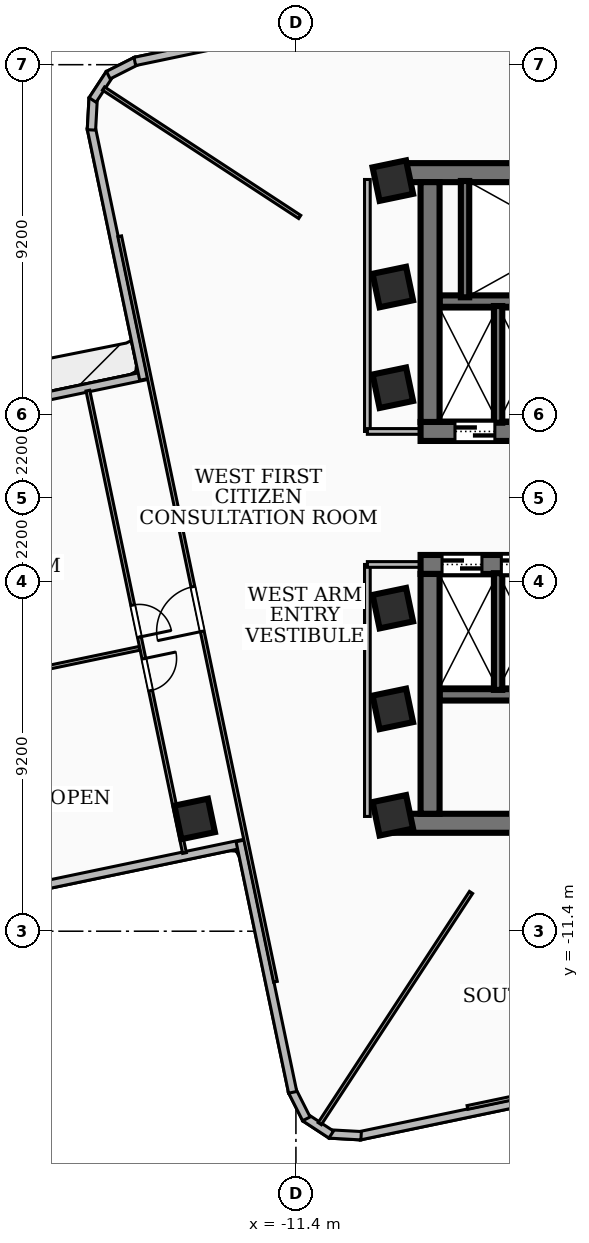
"""IFC4 building model, lengths in metres.
Left out: names, types, materials, properties, quantities, classifications, styles, units other than length and angle.
Written with IfcOpenShell. Run it as: python <this file> out.ifc"""

import sys

from ifc_helpers import new_model, si_unit, direction, frame, frame_2d, origin, origin_2d, place, context, subcontext, project, spatial, rectangle, extrude, element, fill, save


model = new_model("IFC4")
c1 = context("Model", 3, precision=1e-05, world=origin(), true_north=direction((0.0, 1.0)))
c2 = subcontext(c1, "Body", "Model", "MODEL_VIEW")
j1 = project(units=[si_unit("LENGTHUNIT", "METRE"), si_unit("PLANEANGLEUNIT", "RADIAN")], contexts=[c1])
p1 = place(None, origin())
s1 = spatial("IfcSite", under=j1, at=p1, CompositionType="ELEMENT")
p2 = place(p1, origin())
s2 = spatial("IfcBuilding", under=s1, at=p2, CompositionType="ELEMENT")
p3 = place(p2, frame((0.0, 0.0, 111.96)))
s3 = spatial("IfcBuildingStorey", under=s2, at=p3, CompositionType="ELEMENT", Elevation=111.96)
p4 = place(p3, frame((-8.78, 8.56, 0.0), z_axis=(0.0, 0.0, 1.0), x_axis=(1.0, 0.0, 0.0)))
e1 = element("IfcWall", 1, at=p4, inside=s3, PredefinedType="SHEAR", context=c2, shape_type="SweptSolid", body=[
    extrude(rectangle(XDim=17.56, YDim=0.5, at=frame_2d((8.78, 0.0))), origin(), (0.0, 0.0, 1.0), 4.06),
])
p5 = place(p3, frame((8.12, 1.75, 0.0), z_axis=(0.0, 0.0, 1.0), x_axis=(-1.0, 0.0, 0.0)))
e2 = element("IfcWall", 2, at=p5, inside=s3, PredefinedType="SHEAR", context=c2, shape_type="SweptSolid", body=[
    extrude(rectangle(XDim=16.24, YDim=0.5, at=frame_2d((8.12, 0.0))), origin(), (0.0, 0.0, 1.0), 4.06),
])
p6 = place(p5, frame((7.45, 0.0, 0.0)))
e3 = element("IfcOpeningElement", 3, at=p6, cuts=e2, PredefinedType="OPENING", context=c2, shape_type="SweptSolid", body=[
    extrude(rectangle(XDim=1.0, YDim=2.1, at=frame_2d((0.5, 1.05))), frame((0.0, 0.26, 0.0), z_axis=(0.0, -1.0, 0.0), x_axis=(1.0, 0.0, 0.0)), (0.0, 0.0, 1.0), 0.52),
])
p7 = place(p5, frame((14.285, 0.0, 0.0)))
e4 = element("IfcOpeningElement", 4, at=p7, cuts=e2, PredefinedType="OPENING", context=c2, shape_type="SweptSolid", body=[
    extrude(rectangle(XDim=1.05, YDim=2.15, at=frame_2d((0.525, 1.075))), frame((0.0, 0.26, 0.0), z_axis=(0.0, -1.0, 0.0), x_axis=(1.0, 0.0, 0.0)), (0.0, 0.0, 1.0), 0.52),
])
p8 = place(p5, frame((12.725, 0.0, 0.0)))
e5 = element("IfcOpeningElement", 5, at=p8, cuts=e2, PredefinedType="OPENING", context=c2, shape_type="SweptSolid", body=[
    extrude(rectangle(XDim=1.05, YDim=2.15, at=frame_2d((0.525, 1.075))), frame((0.0, 0.26, 0.0), z_axis=(0.0, -1.0, 0.0), x_axis=(1.0, 0.0, 0.0)), (0.0, 0.0, 1.0), 0.52),
])
p9 = place(p5, frame((11.165, 0.0, 0.0)))
e6 = element("IfcOpeningElement", 6, at=p9, cuts=e2, PredefinedType="OPENING", context=c2, shape_type="SweptSolid", body=[
    extrude(rectangle(XDim=1.05, YDim=2.15, at=frame_2d((0.525, 1.075))), frame((0.0, 0.26, 0.0), z_axis=(0.0, -1.0, 0.0), x_axis=(1.0, 0.0, 0.0)), (0.0, 0.0, 1.0), 0.52),
])
p10 = place(p5, frame((3.85, 0.0, 0.0)))
e7 = element("IfcOpeningElement", 7, at=p10, cuts=e2, PredefinedType="OPENING", context=c2, shape_type="SweptSolid", body=[
    extrude(rectangle(XDim=0.9, YDim=2.06, at=frame_2d((0.45, 1.03))), frame((0.0, 0.26, 0.0), z_axis=(0.0, -1.0, 0.0), x_axis=(1.0, 0.0, 0.0)), (0.0, 0.0, 1.0), 0.52),
])
p11 = place(p5, frame((2.35, 0.0, 0.0)))
e8 = element("IfcOpeningElement", 8, at=p11, cuts=e2, PredefinedType="OPENING", context=c2, shape_type="SweptSolid", body=[
    extrude(rectangle(XDim=0.9, YDim=2.06, at=frame_2d((0.45, 1.03))), frame((0.0, 0.26, 0.0), z_axis=(0.0, -1.0, 0.0), x_axis=(1.0, 0.0, 0.0)), (0.0, 0.0, 1.0), 0.52),
])
p12 = place(p5, frame((0.8, 0.0, 0.0)))
e9 = element("IfcOpeningElement", 9, at=p12, cuts=e2, PredefinedType="OPENING", context=c2, shape_type="SweptSolid", body=[
    extrude(rectangle(XDim=0.9, YDim=2.06, at=frame_2d((0.45, 1.03))), frame((0.0, 0.26, 0.0), z_axis=(0.0, -1.0, 0.0), x_axis=(1.0, 0.0, 0.0)), (0.0, 0.0, 1.0), 0.52),
])
p13 = place(p3, frame((-7.87, 2.0, 0.0), z_axis=(0.0, 0.0, 1.0), x_axis=(0.0, 1.0, 0.0)))
e10 = element("IfcWall", 10, at=p13, inside=s3, PredefinedType="SHEAR", context=c2, shape_type="SweptSolid", body=[
    extrude(rectangle(XDim=6.31, YDim=0.5, at=frame_2d((3.155, 0.0))), origin(), (0.0, 0.0, 1.0), 4.06),
])
p14 = place(p3, frame((7.62, 5.18, 0.0), z_axis=(0.0, 0.0, 1.0), x_axis=(-1.0, 0.0, 0.0)))
e11 = element("IfcWall", 11, at=p14, inside=s3, PredefinedType="SOLIDWALL", context=c2, shape_type="SweptSolid", body=[
    extrude(rectangle(XDim=15.24, YDim=0.3, at=frame_2d((7.62, 0.0))), origin(), (0.0, 0.0, 1.0), 4.06),
])
p15 = place(p14, frame((5.77, 0.0, 0.0)))
e12 = element("IfcOpeningElement", 12, at=p15, cuts=e11, PredefinedType="OPENING", context=c2, shape_type="SweptSolid", body=[
    extrude(rectangle(XDim=1.1, YDim=2.15, at=frame_2d((0.55, 1.075))), frame((0.0, 0.16, 0.0), z_axis=(0.0, -1.0, 0.0), x_axis=(1.0, 0.0, 0.0)), (0.0, 0.0, 1.0), 0.32),
])
p16 = place(p14, frame((2.97, 0.0, 0.0)))
e13 = element("IfcOpeningElement", 13, at=p16, cuts=e11, PredefinedType="OPENING", context=c2, shape_type="SweptSolid", body=[
    extrude(rectangle(XDim=1.1, YDim=2.15, at=frame_2d((0.55, 1.075))), frame((0.0, 0.16, 0.0), z_axis=(0.0, -1.0, 0.0), x_axis=(1.0, 0.0, 0.0)), (0.0, 0.0, 1.0), 0.32),
])
p17 = place(p14, frame((7.97, 0.0, 0.0)))
e14 = element("IfcOpeningElement", 14, at=p17, cuts=e11, PredefinedType="OPENING", context=c2, shape_type="SweptSolid", body=[
    extrude(rectangle(XDim=1.0, YDim=2.1, at=frame_2d((0.5, 1.05))), frame((0.0, 0.16, 0.0), z_axis=(0.0, -1.0, 0.0), x_axis=(1.0, 0.0, 0.0)), (0.0, 0.0, 1.0), 0.32),
])
p18 = place(p3, frame((8.78, -8.56, 0.0), z_axis=(0.0, 0.0, 1.0), x_axis=(-1.0, 0.0, 0.0)))
e15 = element("IfcWall", 15, at=p18, inside=s3, PredefinedType="SHEAR", context=c2, shape_type="SweptSolid", body=[
    extrude(rectangle(XDim=17.56, YDim=0.5, at=frame_2d((8.78, 0.0))), origin(), (0.0, 0.0, 1.0), 4.06),
])
p19 = place(p3, frame((-8.12, -1.75, 0.0), z_axis=(0.0, 0.0, 1.0), x_axis=(1.0, 0.0, 0.0)))
e16 = element("IfcWall", 16, at=p19, inside=s3, PredefinedType="SHEAR", context=c2, shape_type="SweptSolid", body=[
    extrude(rectangle(XDim=16.24, YDim=0.5, at=frame_2d((8.12, 0.0))), origin(), (0.0, 0.0, 1.0), 4.06),
])
p20 = place(p19, frame((7.45, 0.0, 0.0)))
e17 = element("IfcOpeningElement", 17, at=p20, cuts=e16, PredefinedType="OPENING", context=c2, shape_type="SweptSolid", body=[
    extrude(rectangle(XDim=1.0, YDim=2.1, at=frame_2d((0.5, 1.05))), frame((0.0, 0.26, 0.0), z_axis=(0.0, -1.0, 0.0), x_axis=(1.0, 0.0, 0.0)), (0.0, 0.0, 1.0), 0.52),
])
p21 = place(p19, frame((12.65, 0.0, 0.0)))
e18 = element("IfcOpeningElement", 18, at=p21, cuts=e16, PredefinedType="OPENING", context=c2, shape_type="SweptSolid", body=[
    extrude(rectangle(XDim=0.9, YDim=2.06, at=frame_2d((0.45, 1.03))), frame((0.0, 0.26, 0.0), z_axis=(0.0, -1.0, 0.0), x_axis=(1.0, 0.0, 0.0)), (0.0, 0.0, 1.0), 0.52),
])
p22 = place(p19, frame((0.565, 0.0, 0.0)))
e19 = element("IfcOpeningElement", 19, at=p22, cuts=e16, PredefinedType="OPENING", context=c2, shape_type="SweptSolid", body=[
    extrude(rectangle(XDim=1.05, YDim=2.15, at=frame_2d((0.525, 1.075))), frame((0.0, 0.26, 0.0), z_axis=(0.0, -1.0, 0.0), x_axis=(1.0, 0.0, 0.0)), (0.0, 0.0, 1.0), 0.52),
])
p23 = place(p19, frame((2.125, 0.0, 0.0)))
e20 = element("IfcOpeningElement", 20, at=p23, cuts=e16, PredefinedType="OPENING", context=c2, shape_type="SweptSolid", body=[
    extrude(rectangle(XDim=1.05, YDim=2.15, at=frame_2d((0.525, 1.075))), frame((0.0, 0.26, 0.0), z_axis=(0.0, -1.0, 0.0), x_axis=(1.0, 0.0, 0.0)), (0.0, 0.0, 1.0), 0.52),
])
p24 = place(p19, frame((3.685, 0.0, 0.0)))
e21 = element("IfcOpeningElement", 21, at=p24, cuts=e16, PredefinedType="OPENING", context=c2, shape_type="SweptSolid", body=[
    extrude(rectangle(XDim=1.05, YDim=2.15, at=frame_2d((0.525, 1.075))), frame((0.0, 0.26, 0.0), z_axis=(0.0, -1.0, 0.0), x_axis=(1.0, 0.0, 0.0)), (0.0, 0.0, 1.0), 0.52),
])
p25 = place(p3, frame((-7.87, -8.31, 0.0), z_axis=(0.0, 0.0, 1.0), x_axis=(0.0, 1.0, 0.0)))
e22 = element("IfcWall", 22, at=p25, inside=s3, PredefinedType="SHEAR", context=c2, shape_type="SweptSolid", body=[
    extrude(rectangle(XDim=6.31, YDim=0.5, at=frame_2d((3.155, 0.0))), origin(), (0.0, 0.0, 1.0), 4.06),
])
p26 = place(p3, frame((-7.62, -5.18, 0.0), z_axis=(0.0, 0.0, 1.0), x_axis=(1.0, 0.0, 0.0)))
e23 = element("IfcWall", 23, at=p26, inside=s3, PredefinedType="SOLIDWALL", context=c2, shape_type="SweptSolid", body=[
    extrude(rectangle(XDim=15.24, YDim=0.3, at=frame_2d((7.62, 0.0))), origin(), (0.0, 0.0, 1.0), 4.06),
])
p27 = place(p26, frame((5.77, 0.0, 0.0)))
e24 = element("IfcOpeningElement", 24, at=p27, cuts=e23, PredefinedType="OPENING", context=c2, shape_type="SweptSolid", body=[
    extrude(rectangle(XDim=1.1, YDim=2.15, at=frame_2d((0.55, 1.075))), frame((0.0, 0.16, 0.0), z_axis=(0.0, -1.0, 0.0), x_axis=(1.0, 0.0, 0.0)), (0.0, 0.0, 1.0), 0.32),
])
p28 = place(p26, frame((7.97, 0.0, 0.0)))
e25 = element("IfcOpeningElement", 25, at=p28, cuts=e23, PredefinedType="OPENING", context=c2, shape_type="SweptSolid", body=[
    extrude(rectangle(XDim=1.0, YDim=2.1, at=frame_2d((0.5, 1.05))), frame((0.0, 0.16, 0.0), z_axis=(0.0, -1.0, 0.0), x_axis=(1.0, 0.0, 0.0)), (0.0, 0.0, 1.0), 0.32),
])
p29 = place(p3, frame((-6.95, 5.28, 0.0), z_axis=(0.0, 0.0, 1.0), x_axis=(0.0, 1.0, 0.0)))
e26 = element("IfcWall", 26, at=p29, inside=s3, PredefinedType="SOLIDWALL", context=c2, shape_type="SweptSolid", body=[
    extrude(rectangle(XDim=3.06, YDim=0.22, at=frame_2d((1.53, 0.0))), origin(), (0.0, 0.0, 1.0), 4.06),
])
for number, where, z_axis, x_axis in (
    (27, (-6.08, 1.98, 0.0), (0.0, 0.0, 1.0), (0.0, 1.0, 0.0)),
    (28, (-6.08, -5.05, 0.0), (0.0, 0.0, 1.0), (0.0, 1.0, 0.0)),
):
    element("IfcWall", number, at=place(p3, frame(where, z_axis=z_axis, x_axis=x_axis)), inside=s3, PredefinedType="SOLIDWALL", context=c2, shape_type="SweptSolid", body=[
        extrude(rectangle(XDim=3.07, YDim=0.22, at=frame_2d((1.535, 0.0))), origin(), (0.0, 0.0, 1.0), 4.06),
    ])
for number, where, z_axis, x_axis in (
    (29, (-8.85, -5.55, 0.0), (0.0, 0.0, 1.0), (0.979, 0.204, 0.0)),
    (30, (-8.85, -2.9, 0.0), (0.0, 0.0, 1.0), (0.979, 0.204, 0.0)),
    (31, (-8.85, 2.9, 0.0), (0.0, 0.0, 1.0), (0.979, 0.204, 0.0)),
    (32, (-8.85, 5.55, 0.0), (0.0, 0.0, 1.0), (0.979, 0.204, 0.0)),
    (33, (-8.85, 8.35, 0.0), (0.0, 0.0, 1.0), (0.979, 0.204, 0.0)),
    (34, (-8.85, -8.35, 0.0), (0.0, 0.0, 1.0), (0.979, 0.204, 0.0)),
    (35, (-14.064, -8.445, 0.0), (0.0, 0.0, 1.0), (0.979, 0.204, 0.0)),
):
    element("IfcColumn", number, at=place(p3, frame(where, z_axis=z_axis, x_axis=x_axis)), inside=s3, PredefinedType="COLUMN", context=c2, shape_type="SweptSolid", body=[
        extrude(rectangle(XDim=0.9, YDim=0.9, at=origin_2d()), origin(), (0.0, 0.0, 1.0), 4.32),
    ])
p30 = place(p3, frame((-12.763, -9.092, 0.0), z_axis=(0.0, 0.0, 1.0), x_axis=(-0.97886813171, -0.204492495517, 0.0)))
e36 = element("IfcWall", 36, at=p30, inside=s3, PredefinedType="SOLIDWALL", context=c2, shape_type="SweptSolid", body=[
    extrude(rectangle(XDim=13.458, YDim=0.22, at=frame_2d((6.729, 0.0))), origin(), (0.0, 0.0, 1.0), 4.06),
])
p31 = place(p30, frame((10.257, 0.0, 0.85)))
e37 = element("IfcOpeningElement", 37, at=p31, cuts=e36, PredefinedType="OPENING", context=c2, shape_type="SweptSolid", body=[
    extrude(rectangle(XDim=2.1, YDim=2.0, at=frame_2d((1.05, 1.0))), frame((0.0, 0.12, 0.0), z_axis=(0.0, -1.0, 0.0), x_axis=(1.0, 0.0, 0.0)), (0.0, 0.0, 1.0), 0.24),
])
p32 = place(p3, frame((-28.509, 0.47, 0.0), z_axis=(0.0, 0.0, 1.0), x_axis=(0.97885663995, 0.204547496749, 0.0)))
e38 = element("IfcWall", 38, at=p32, inside=s3, PredefinedType="SOLIDWALL", context=c2, shape_type="SweptSolid", body=[
    extrude(rectangle(XDim=13.459, YDim=0.22, at=frame_2d((6.729, 0.0))), origin(), (0.0, 0.0, 1.0), 4.06),
])
p33 = place(p32, frame((1.1, 0.0, 0.85)))
e39 = element("IfcOpeningElement", 39, at=p33, cuts=e38, PredefinedType="OPENING", context=c2, shape_type="SweptSolid", body=[
    extrude(rectangle(XDim=2.1, YDim=1.6, at=frame_2d((1.05, 0.8))), frame((0.0, 0.12, 0.0), z_axis=(0.0, -1.0, 0.0), x_axis=(1.0, 0.0, 0.0)), (0.0, 0.0, 1.0), 0.24),
])
p34 = place(p3, frame((-15.403, 3.119, 0.0), z_axis=(0.0, 0.0, 1.0), x_axis=(-0.204509735336, 0.978864530031, 0.0)))
e40 = element("IfcWall", 40, at=p34, inside=s3, PredefinedType="SOLIDWALL", context=c2, shape_type="SweptSolid", body=[
    extrude(rectangle(XDim=6.757, YDim=0.22, at=frame_2d((3.378, 0.0))), origin(), (0.0, 0.0, 1.0), 4.06),
])
p35 = place(p3, frame((-16.781, 9.684, 0.0), z_axis=(0.0, 0.0, 1.0), x_axis=(0.055016197793, 0.998485462078, 0.0)))
e41 = element("IfcWall", 41, at=p35, inside=s3, PredefinedType="SOLIDWALL", context=c2, shape_type="SweptSolid", body=[
    extrude(rectangle(XDim=0.834, YDim=0.22, at=frame_2d((0.417, 0.0))), origin(), (0.0, 0.0, 1.0), 4.06),
])
p36 = place(p3, frame((-16.75, 10.471, 0.0), z_axis=(0.0, 0.0, 1.0), x_axis=(0.54760232045, 0.836738727822, 0.0)))
e42 = element("IfcWall", 42, at=p36, inside=s3, PredefinedType="SOLIDWALL", context=c2, shape_type="SweptSolid", body=[
    extrude(rectangle(XDim=0.82, YDim=0.22, at=frame_2d((0.41, 0.0))), origin(), (0.0, 0.0, 1.0), 4.06),
])
p37 = place(p3, frame((-16.337, 11.125, 0.0), z_axis=(0.0, 0.0, 1.0), x_axis=(0.892485652426, 0.45107578101, 0.0)))
e43 = element("IfcWall", 43, at=p37, inside=s3, PredefinedType="SOLIDWALL", context=c2, shape_type="SweptSolid", body=[
    extrude(rectangle(XDim=0.833, YDim=0.22, at=frame_2d((0.417, 0.0))), origin(), (0.0, 0.0, 1.0), 4.06),
])
p38 = place(p3, frame((-15.639, 11.485, 0.0), z_axis=(0.0, 0.0, 1.0), x_axis=(0.978870573598, 0.204480806295, 0.0)))
e44 = element("IfcWall", 44, at=p38, inside=s3, PredefinedType="SOLIDWALL", context=c2, shape_type="SweptSolid", body=[
    extrude(rectangle(XDim=6.758, YDim=0.22, at=frame_2d((3.379, 0.0))), origin(), (0.0, 0.0, 1.0), 4.06),
])
p39 = place(p3, frame((-3.119, -15.403, 0.0), z_axis=(0.0, 0.0, 1.0), x_axis=(-0.978864530031, -0.204509735336, 0.0)))
e45 = element("IfcWall", 45, at=p39, inside=s3, PredefinedType="SOLIDWALL", context=c2, shape_type="SweptSolid", body=[
    extrude(rectangle(XDim=6.757, YDim=0.22, at=frame_2d((3.378, 0.0))), origin(), (0.0, 0.0, 1.0), 3.29),
])
p40 = place(p3, frame((-9.684, -16.781, 0.0), z_axis=(0.0, 0.0, 1.0), x_axis=(-0.998485462078, 0.055016197793, 0.0)))
e46 = element("IfcWall", 46, at=p40, inside=s3, PredefinedType="SOLIDWALL", context=c2, shape_type="SweptSolid", body=[
    extrude(rectangle(XDim=0.834, YDim=0.22, at=frame_2d((0.417, 0.0))), origin(), (0.0, 0.0, 1.0), 4.06),
])
p41 = place(p3, frame((-10.471, -16.75, 0.0), z_axis=(0.0, 0.0, 1.0), x_axis=(-0.836738727822, 0.54760232045, 0.0)))
e47 = element("IfcWall", 47, at=p41, inside=s3, PredefinedType="SOLIDWALL", context=c2, shape_type="SweptSolid", body=[
    extrude(rectangle(XDim=0.82, YDim=0.22, at=frame_2d((0.41, 0.0))), origin(), (0.0, 0.0, 1.0), 4.06),
])
p42 = place(p3, frame((-11.125, -16.337, 0.0), z_axis=(0.0, 0.0, 1.0), x_axis=(-0.45107578101, 0.892485652426, 0.0)))
e48 = element("IfcWall", 48, at=p42, inside=s3, PredefinedType="SOLIDWALL", context=c2, shape_type="SweptSolid", body=[
    extrude(rectangle(XDim=0.833, YDim=0.22, at=frame_2d((0.417, 0.0))), origin(), (0.0, 0.0, 1.0), 4.06),
])
p43 = place(p3, frame((-11.485, -15.639, 0.0), z_axis=(0.0, 0.0, 1.0), x_axis=(-0.204480806295, 0.978870573598, 0.0)))
e49 = element("IfcWall", 49, at=p43, inside=s3, PredefinedType="SOLIDWALL", context=c2, shape_type="SweptSolid", body=[
    extrude(rectangle(XDim=6.758, YDim=0.22, at=frame_2d((3.379, 0.0))), origin(), (0.0, 0.0, 1.0), 4.06),
])
p44 = place(p3, frame((-9.52, 1.75, 0.0), z_axis=(0.0, 0.0, 1.0), x_axis=(0.0, 1.0, 0.0)))
e50 = element("IfcWall", 50, at=p44, inside=s3, PredefinedType="PARTITIONING", context=c2, shape_type="SweptSolid", body=[
    extrude(rectangle(XDim=6.63, YDim=0.15, at=frame_2d((3.315, 0.0))), origin(), (0.0, 0.0, 1.0), 3.29),
])
p45 = place(p3, frame((-7.85, 1.75, 0.0), z_axis=(0.0, 0.0, 1.0), x_axis=(-1.0, 0.0, 0.0)))
e51 = element("IfcWall", 51, at=p45, inside=s3, PredefinedType="PARTITIONING", context=c2, shape_type="SweptSolid", body=[
    extrude(rectangle(XDim=1.67, YDim=0.15, at=frame_2d((0.835, 0.0))), origin(), (0.0, 0.0, 1.0), 3.29),
])
p46 = place(p3, frame((-9.52, -8.38, 0.0), z_axis=(0.0, 0.0, 1.0), x_axis=(0.0, 1.0, 0.0)))
e52 = element("IfcWall", 52, at=p46, inside=s3, PredefinedType="PARTITIONING", context=c2, shape_type="SweptSolid", body=[
    extrude(rectangle(XDim=6.63, YDim=0.15, at=frame_2d((3.315, 0.0))), origin(), (0.0, 0.0, 1.0), 3.29),
])
p47 = place(p3, frame((-7.85, -1.75, 0.0), z_axis=(0.0, 0.0, 1.0), x_axis=(-1.0, 0.0, 0.0)))
e53 = element("IfcWall", 53, at=p47, inside=s3, PredefinedType="PARTITIONING", context=c2, shape_type="SweptSolid", body=[
    extrude(rectangle(XDim=1.67, YDim=0.15, at=frame_2d((0.835, 0.0))), origin(), (0.0, 0.0, 1.0), 3.29),
])
p48 = place(p3, frame((-11.3, 7.394, 0.0), z_axis=(0.0, 0.0, 1.0), x_axis=(-0.836731843599, 0.547612839429, 0.0)))
e54 = element("IfcWall", 54, at=p48, inside=s3, PredefinedType="PARTITIONING", context=c2, shape_type="SweptSolid", body=[
    extrude(rectangle(XDim=6.17, YDim=0.1, at=frame_2d((3.085, 0.0))), origin(), (0.0, 0.0, 1.0), 4.06),
])
p49 = place(p3, frame((-6.792, -10.38, 0.0), z_axis=(0.0, 0.0, 1.0), x_axis=(-0.547596764532, -0.836742363858, 0.0)))
e55 = element("IfcWall", 55, at=p49, inside=s3, PredefinedType="PARTITIONING", context=c2, shape_type="SweptSolid", body=[
    extrude(rectangle(XDim=7.27, YDim=0.1, at=frame_2d((3.635, 0.0))), origin(), (0.0, 0.0, 1.0), 3.29),
])
p50 = place(p3, frame((-11.939, -12.73, 0.0), z_axis=(0.0, 0.0, 1.0), x_axis=(-0.204503489908, 0.978865834839, 0.0)))
e56 = element("IfcWall", 56, at=p50, inside=s3, PredefinedType="PARTITIONING", context=c2, shape_type="SweptSolid", body=[
    extrude(rectangle(XDim=20.04, YDim=0.1, at=frame_2d((10.02, 0.0))), origin(), (0.0, 0.0, 1.0), 3.29),
])
p51 = place(p50, frame((9.42, 0.0, 0.0)))
e57 = element("IfcOpeningElement", 57, at=p51, cuts=e56, PredefinedType="OPENING", context=c2, shape_type="SweptSolid", body=[
    extrude(rectangle(XDim=1.2, YDim=2.1, at=frame_2d((0.6, 1.05))), frame((0.0, 0.06, 0.0), z_axis=(0.0, -1.0, 0.0), x_axis=(1.0, 0.0, 0.0)), (0.0, 0.0, 1.0), 0.12),
])
p52 = place(p3, frame((-15.519, -3.957, 0.0), z_axis=(0.0, 0.0, 1.0), x_axis=(-0.978858202992, -0.20454001671, 0.0)))
e58 = element("IfcWall", 58, at=p52, inside=s3, PredefinedType="PARTITIONING", context=c2, shape_type="SweptSolid", body=[
    extrude(rectangle(XDim=13.214, YDim=0.1, at=frame_2d((6.607, 0.0))), origin(), (0.0, 0.0, 1.0), 3.44),
])
p53 = place(p3, frame((-16.874, 2.824, 0.0), z_axis=(0.0, 0.0, 1.0), x_axis=(0.204509549155, -0.978864568929, 0.0)))
e59 = element("IfcWall", 59, at=p53, inside=s3, PredefinedType="PARTITIONING", context=c2, shape_type="SweptSolid", body=[
    extrude(rectangle(XDim=12.43, YDim=0.1, at=frame_2d((6.215, 0.0))), origin(), (0.0, 0.0, 1.0), 3.29),
])
p54 = place(p53, frame((5.765, 0.0, 0.0)))
e60 = element("IfcOpeningElement", 60, at=p54, cuts=e59, PredefinedType="OPENING", context=c2, shape_type="SweptSolid", body=[
    extrude(rectangle(XDim=0.86, YDim=2.04, at=frame_2d((0.43, 1.02))), frame((0.0, 0.06, 0.0), z_axis=(0.0, -1.0, 0.0), x_axis=(1.0, 0.0, 0.0)), (0.0, 0.0, 1.0), 0.12),
])
p55 = place(p53, frame((7.205, 0.0, 0.0)))
e61 = element("IfcOpeningElement", 61, at=p55, cuts=e59, PredefinedType="OPENING", context=c2, shape_type="SweptSolid", body=[
    extrude(rectangle(XDim=0.86, YDim=2.04, at=frame_2d((0.43, 1.02))), frame((0.0, 0.06, 0.0), z_axis=(0.0, -1.0, 0.0), x_axis=(1.0, 0.0, 0.0)), (0.0, 0.0, 1.0), 0.12),
])
p56 = place(p3, frame((12.73, -11.939, 0.0), z_axis=(0.0, 0.0, 1.0), x_axis=(-0.978865834839, -0.204503489908, 0.0)))
e62 = element("IfcWall", 62, at=p56, inside=s3, PredefinedType="PARTITIONING", context=c2, shape_type="SweptSolid", body=[
    extrude(rectangle(XDim=20.04, YDim=0.1, at=frame_2d((10.02, 0.0))), origin(), (0.0, 0.0, 1.0), 3.29),
])
p57 = place(p56, frame((9.42, 0.0, 0.0)))
e63 = element("IfcOpeningElement", 63, at=p57, cuts=e62, PredefinedType="OPENING", context=c2, shape_type="SweptSolid", body=[
    extrude(rectangle(XDim=1.2, YDim=2.1, at=frame_2d((0.6, 1.05))), frame((0.0, 0.06, 0.0), z_axis=(0.0, -1.0, 0.0), x_axis=(1.0, 0.0, 0.0)), (0.0, 0.0, 1.0), 0.12),
])
p58 = place(p7, origin())
e64 = element("IfcDoor", 64, at=p58, inside=s3, OperationType="DOUBLE_DOOR_SLIDING", PredefinedType="DOOR", context=c2, shape_type="SweptSolid", body=[
    extrude(rectangle(XDim=1.05, YDim=2.15, at=frame_2d((0.525, 1.075))), frame((0.0, 0.025, 0.0), z_axis=(0.0, -1.0, 0.0), x_axis=(1.0, 0.0, 0.0)), (0.0, 0.0, 1.0), 0.05),
])
fill(e4, e64)
p59 = place(p22, origin())
e65 = element("IfcDoor", 65, at=p59, inside=s3, OperationType="DOUBLE_DOOR_SLIDING", PredefinedType="DOOR", context=c2, shape_type="SweptSolid", body=[
    extrude(rectangle(XDim=1.05, YDim=2.15, at=frame_2d((0.525, 1.075))), frame((0.0, 0.025, 0.0), z_axis=(0.0, -1.0, 0.0), x_axis=(1.0, 0.0, 0.0)), (0.0, 0.0, 1.0), 0.05),
])
fill(e19, e65)
p60 = place(p23, origin())
e66 = element("IfcDoor", 66, at=p60, inside=s3, OperationType="DOUBLE_DOOR_SLIDING", PredefinedType="DOOR", context=c2, shape_type="SweptSolid", body=[
    extrude(rectangle(XDim=1.05, YDim=2.15, at=frame_2d((0.525, 1.075))), frame((0.0, 0.025, 0.0), z_axis=(0.0, -1.0, 0.0), x_axis=(1.0, 0.0, 0.0)), (0.0, 0.0, 1.0), 0.05),
])
fill(e20, e66)
p61 = place(p51, origin())
e67 = element("IfcDoor", 67, at=p61, inside=s3, OperationType="SINGLE_SWING_LEFT", PredefinedType="DOOR", context=c2, shape_type="SweptSolid", body=[
    extrude(rectangle(XDim=1.2, YDim=2.1, at=frame_2d((0.6, 1.05))), frame((0.0, 0.025, 0.0), z_axis=(0.0, -1.0, 0.0), x_axis=(1.0, 0.0, 0.0)), (0.0, 0.0, 1.0), 0.05),
])
fill(e57, e67)
p62 = place(p54, origin())
e68 = element("IfcDoor", 68, at=p62, inside=s3, OperationType="SINGLE_SWING_RIGHT", PredefinedType="DOOR", context=c2, shape_type="SweptSolid", body=[
    extrude(rectangle(XDim=0.86, YDim=2.04, at=frame_2d((0.43, 1.02))), frame((0.0, 0.025, 0.0), z_axis=(0.0, -1.0, 0.0), x_axis=(1.0, 0.0, 0.0)), (0.0, 0.0, 1.0), 0.05),
])
fill(e60, e68)
p63 = place(p55, origin())
e69 = element("IfcDoor", 69, at=p63, inside=s3, OperationType="SINGLE_SWING_LEFT", PredefinedType="DOOR", context=c2, shape_type="SweptSolid", body=[
    extrude(rectangle(XDim=0.86, YDim=2.04, at=frame_2d((0.43, 1.02))), frame((0.0, 0.025, 0.0), z_axis=(0.0, -1.0, 0.0), x_axis=(1.0, 0.0, 0.0)), (0.0, 0.0, 1.0), 0.05),
])
fill(e61, e69)
save(model, sys.argv[1])
